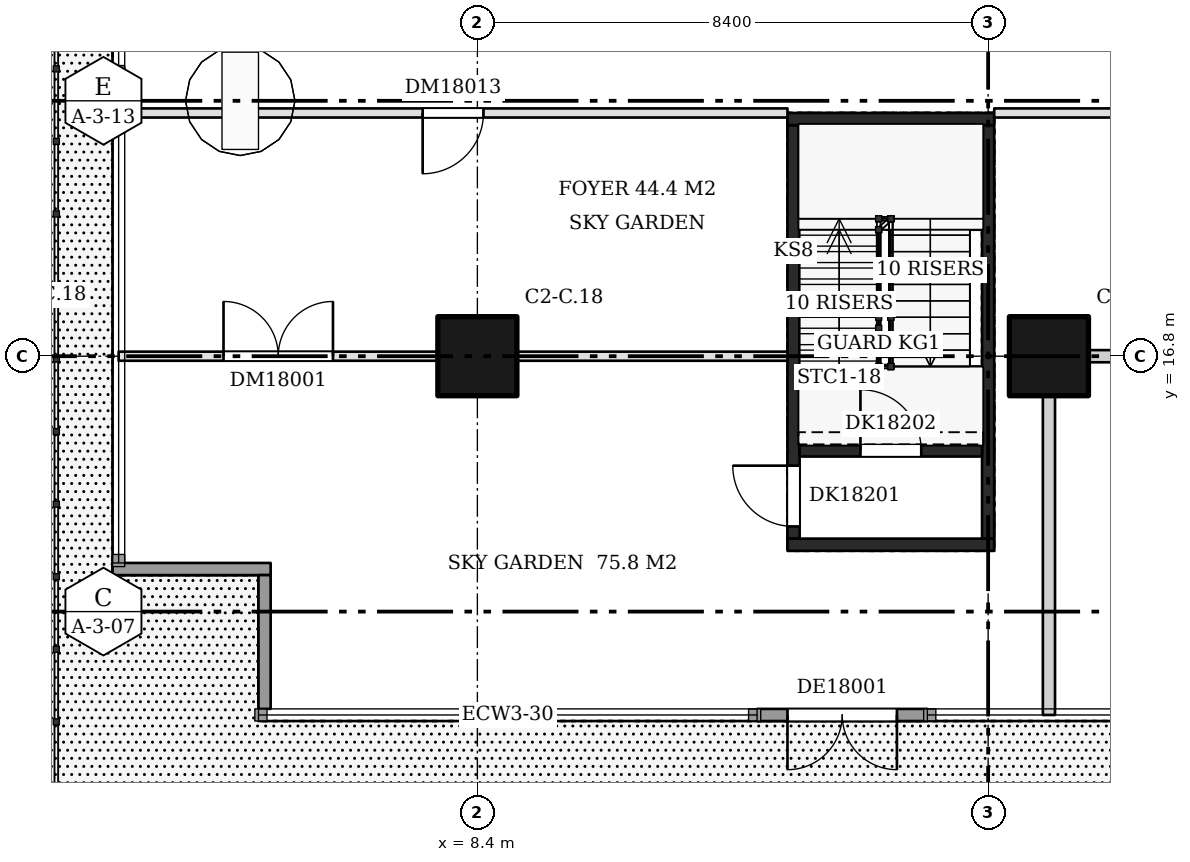
"""IFC4 building model, lengths in metres.
Left out: names, types, materials, properties, quantities, classifications, styles, units other than length and angle.
Written with IfcOpenShell. Run it as: python <this file> out.ifc"""

import sys

from ifc_helpers import new_model, si_unit, direction, frame, frame_2d, origin, origin_2d, place, context, subcontext, project, spatial, rectangle, extrude, element, fill, save


model = new_model("IFC4")
c1 = context("Model", 3, precision=1e-05, world=origin(), true_north=direction((0.0, 1.0)))
c2 = subcontext(c1, "Body", "Model", "MODEL_VIEW")
j1 = project(units=[si_unit("LENGTHUNIT", "METRE"), si_unit("PLANEANGLEUNIT", "RADIAN")], contexts=[c1])
p1 = place(None, origin())
s1 = spatial("IfcSite", under=j1, at=p1, CompositionType="ELEMENT")
p2 = place(p1, origin())
s2 = spatial("IfcBuilding", under=s1, at=p2, CompositionType="ELEMENT")
p3 = place(p2, frame((0.0, 0.0, 74.2)))
s3 = spatial("IfcBuildingStorey", under=s2, at=p3, CompositionType="ELEMENT", Elevation=74.2)
for number, where, z_axis, x_axis in (
    (1, (8.4, 16.8, 0.0), (0.0, 0.0, 1.0), (1.0, 0.0, 0.0)),
    (2, (17.8, 16.8, 0.0), (0.0, 0.0, 1.0), (1.0, 0.0, 0.0)),
):
    element("IfcColumn", number, at=place(p3, frame(where, z_axis=z_axis, x_axis=x_axis)), inside=s3, PredefinedType="COLUMN", context=c2, shape_type="SweptSolid", body=[
        extrude(rectangle(XDim=1.3, YDim=1.3, at=origin_2d()), origin(), (0.0, 0.0, 1.0), 6.72),
    ])
p4 = place(p3, frame((13.6, 13.8, 0.0), z_axis=(0.0, 0.0, 1.0), x_axis=(0.0, 1.0, 0.0)))
e3 = element("IfcWall", 3, at=p4, inside=s3, PredefinedType="SHEAR", context=c2, shape_type="SweptSolid", body=[
    extrude(rectangle(XDim=6.8, YDim=0.2, at=frame_2d((3.4, 0.0))), origin(), (0.0, 0.0, 1.0), 6.72),
])
p5 = place(p4, frame((0.2, 0.0, 0.0)))
e4 = element("IfcOpeningElement", 4, at=p5, cuts=e3, PredefinedType="OPENING", context=c2, shape_type="SweptSolid", body=[
    extrude(rectangle(XDim=1.0, YDim=2.1, at=frame_2d((0.5, 1.05))), frame((0.0, 0.11, 0.0), z_axis=(0.0, -1.0, 0.0), x_axis=(1.0, 0.0, 0.0)), (0.0, 0.0, 1.0), 0.22),
])
p6 = place(p3, frame((16.8, 13.8, 0.0), z_axis=(0.0, 0.0, 1.0), x_axis=(0.0, 1.0, 0.0)))
e5 = element("IfcWall", 5, at=p6, inside=s3, PredefinedType="SHEAR", context=c2, shape_type="SweptSolid", body=[
    extrude(rectangle(XDim=6.8, YDim=0.2, at=frame_2d((3.4, 0.0))), origin(), (0.0, 0.0, 1.0), 6.72),
])
for number, where, z_axis, x_axis in (
    (6, (13.5, 13.7, 0.0), (0.0, 0.0, 1.0), (1.0, 0.0, 0.0)),
    (7, (13.5, 20.7, 0.0), (0.0, 0.0, 1.0), (1.0, 0.0, 0.0)),
):
    element("IfcWall", number, at=place(p3, frame(where, z_axis=z_axis, x_axis=x_axis)), inside=s3, PredefinedType="SHEAR", context=c2, shape_type="SweptSolid", body=[
        extrude(rectangle(XDim=3.4, YDim=0.2, at=frame_2d((1.7, 0.0))), origin(), (0.0, 0.0, 1.0), 6.72),
    ])
p7 = place(p3, frame((13.7, 15.25, 0.0), z_axis=(0.0, 0.0, 1.0), x_axis=(1.0, 0.0, 0.0)))
e8 = element("IfcWall", 8, at=p7, inside=s3, PredefinedType="SHEAR", context=c2, shape_type="SweptSolid", body=[
    extrude(rectangle(XDim=3.0, YDim=0.2, at=frame_2d((1.5, 0.0))), origin(), (0.0, 0.0, 1.0), 6.72),
])
p8 = place(p7, frame((1.0, 0.0, 0.0)))
e9 = element("IfcOpeningElement", 9, at=p8, cuts=e8, PredefinedType="OPENING", context=c2, shape_type="SweptSolid", body=[
    extrude(rectangle(XDim=1.0, YDim=2.1, at=frame_2d((0.5, 1.05))), frame((0.0, 0.11, 0.0), z_axis=(0.0, -1.0, 0.0), x_axis=(1.0, 0.0, 0.0)), (0.0, 0.0, 1.0), 0.22),
])
p9 = place(p3, frame((2.5, 16.8, 0.0), z_axis=(0.0, 0.0, 1.0), x_axis=(1.0, 0.0, 0.0)))
e10 = element("IfcWall", 10, at=p9, inside=s3, PredefinedType="PARTITIONING", context=c2, shape_type="SweptSolid", body=[
    extrude(rectangle(XDim=5.25, YDim=0.15, at=frame_2d((2.625, 0.0))), origin(), (0.0, 0.0, 1.0), 6.72),
])
p10 = place(p9, frame((1.725, 0.0, 0.0)))
e11 = element("IfcOpeningElement", 11, at=p10, cuts=e10, PredefinedType="OPENING", context=c2, shape_type="SweptSolid", body=[
    extrude(rectangle(XDim=1.8, YDim=2.1, at=frame_2d((0.9, 1.05))), frame((0.0, 0.085, 0.0), z_axis=(0.0, -1.0, 0.0), x_axis=(1.0, 0.0, 0.0)), (0.0, 0.0, 1.0), 0.17),
])
p11 = place(p3, frame((9.05, 16.8, 0.0), z_axis=(0.0, 0.0, 1.0), x_axis=(1.0, 0.0, 0.0)))
e12 = element("IfcWall", 12, at=p11, inside=s3, PredefinedType="PARTITIONING", context=c2, shape_type="SweptSolid", body=[
    extrude(rectangle(XDim=4.45, YDim=0.15, at=frame_2d((2.225, 0.0))), origin(), (0.0, 0.0, 1.0), 6.72),
])
p12 = place(p3, frame((2.5, 20.8, 0.0), z_axis=(0.0, 0.0, 1.0), x_axis=(1.0, 0.0, 0.0)))
e13 = element("IfcWall", 13, at=p12, inside=s3, PredefinedType="PARTITIONING", context=c2, shape_type="SweptSolid", body=[
    extrude(rectangle(XDim=11.0, YDim=0.15, at=frame_2d((5.5, 0.0))), origin(), (0.0, 0.0, 1.0), 6.72),
])
p13 = place(p12, frame((5.0, 0.0, 0.0)))
e14 = element("IfcOpeningElement", 14, at=p13, cuts=e13, PredefinedType="OPENING", context=c2, shape_type="SweptSolid", body=[
    extrude(rectangle(XDim=1.0, YDim=2.1, at=frame_2d((0.5, 1.05))), frame((0.0, 0.085, 0.0), z_axis=(0.0, -1.0, 0.0), x_axis=(1.0, 0.0, 0.0)), (0.0, 0.0, 1.0), 0.17),
])
p14 = place(p3, frame((16.9, 20.8, 0.0), z_axis=(0.0, 0.0, 1.0), x_axis=(1.0, 0.0, 0.0)))
e15 = element("IfcWall", 15, at=p14, inside=s3, PredefinedType="PARTITIONING", context=c2, shape_type="SweptSolid", body=[
    extrude(rectangle(XDim=19.175, YDim=0.15, at=frame_2d((9.587, 0.0))), origin(), (0.0, 0.0, 1.0), 6.72),
])
p15 = place(p14, frame((9.087, 0.0, 0.0)))
e16 = element("IfcOpeningElement", 16, at=p15, cuts=e15, PredefinedType="OPENING", context=c2, shape_type="SweptSolid", body=[
    extrude(rectangle(XDim=1.0, YDim=2.1, at=frame_2d((0.5, 1.05))), frame((0.0, 0.085, 0.0), z_axis=(0.0, -1.0, 0.0), x_axis=(1.0, 0.0, 0.0)), (0.0, 0.0, 1.0), 0.17),
])
p16 = place(p3, frame((17.8, 10.9, 0.0), z_axis=(0.0, 0.0, 1.0), x_axis=(0.0, 1.0, 0.0)))
e17 = element("IfcWall", 17, at=p16, inside=s3, PredefinedType="PARTITIONING", context=c2, shape_type="SweptSolid", body=[
    extrude(rectangle(XDim=5.25, YDim=0.2, at=frame_2d((2.625, 0.0))), origin(), (0.0, 0.0, 1.0), 6.72),
])
p17 = place(p3, frame((18.45, 16.8, 0.0), z_axis=(0.0, 0.0, 1.0), x_axis=(1.0, 0.0, 0.0)))
e18 = element("IfcWall", 18, at=p17, inside=s3, PredefinedType="PARTITIONING", context=c2, shape_type="SweptSolid", body=[
    extrude(rectangle(XDim=3.05, YDim=0.2, at=frame_2d((1.525, 0.0))), origin(), (0.0, 0.0, 1.0), 6.72),
])
p18 = place(p17, frame((1.025, 0.0, 0.0)))
e19 = element("IfcOpeningElement", 19, at=p18, cuts=e18, PredefinedType="OPENING", context=c2, shape_type="SweptSolid", body=[
    extrude(rectangle(XDim=1.0, YDim=2.1, at=frame_2d((0.5, 1.05))), frame((0.0, 0.11, 0.0), z_axis=(0.0, -1.0, 0.0), x_axis=(1.0, 0.0, 0.0)), (0.0, 0.0, 1.0), 0.22),
])
p19 = place(p3, frame((2.4, 13.3, 0.0), z_axis=(0.0, 0.0, 1.0), x_axis=(1.0, 0.0, 0.0)))
e20 = element("IfcWall", 20, at=p19, inside=s3, PredefinedType="SOLIDWALL", context=c2, shape_type="SweptSolid", body=[
    extrude(rectangle(XDim=2.6, YDim=0.2, at=frame_2d((1.3, 0.0))), origin(), (0.0, 0.0, 1.0), 6.72),
])
p20 = place(p3, frame((4.9, 13.2, 0.0), z_axis=(0.0, 0.0, 1.0), x_axis=(0.0, -1.0, 0.0)))
e21 = element("IfcWall", 21, at=p20, inside=s3, PredefinedType="SOLIDWALL", context=c2, shape_type="SweptSolid", body=[
    extrude(rectangle(XDim=2.2, YDim=0.2, at=frame_2d((1.1, 0.0))), origin(), (0.0, 0.0, 1.0), 6.72),
])
p21 = place(p3, frame((13.0, 10.9, 0.0), z_axis=(0.0, 0.0, 1.0), x_axis=(1.0, 0.0, 0.0)))
e22 = element("IfcWall", 22, at=p21, inside=s3, PredefinedType="SOLIDWALL", context=c2, shape_type="SweptSolid", body=[
    extrude(rectangle(XDim=2.8, YDim=0.2, at=frame_2d((1.4, 0.0))), origin(), (0.0, 0.0, 1.0), 6.72),
])
p22 = place(p21, frame((0.5, 0.0, 0.0)))
e23 = element("IfcOpeningElement", 23, at=p22, cuts=e22, PredefinedType="OPENING", context=c2, shape_type="SweptSolid", body=[
    extrude(rectangle(XDim=1.8, YDim=2.4, at=frame_2d((0.9, 1.2))), frame((0.0, 0.11, 0.0), z_axis=(0.0, -1.0, 0.0), x_axis=(1.0, 0.0, 0.0)), (0.0, 0.0, 1.0), 0.22),
])
p23 = place(p5, origin())
e24 = element("IfcDoor", 24, at=p23, inside=s3, OperationType="SINGLE_SWING_RIGHT", PredefinedType="DOOR", context=c2, shape_type="SweptSolid", body=[
    extrude(rectangle(XDim=1.0, YDim=2.1, at=frame_2d((0.5, 1.05))), frame((0.0, 0.025, 0.0), z_axis=(0.0, -1.0, 0.0), x_axis=(1.0, 0.0, 0.0)), (0.0, 0.0, 1.0), 0.05),
])
fill(e4, e24)
p24 = place(p8, origin())
e25 = element("IfcDoor", 25, at=p24, inside=s3, OperationType="SINGLE_SWING_LEFT", PredefinedType="DOOR", context=c2, shape_type="SweptSolid", body=[
    extrude(rectangle(XDim=1.0, YDim=2.1, at=frame_2d((0.5, 1.05))), frame((0.0, 0.025, 0.0), z_axis=(0.0, -1.0, 0.0), x_axis=(1.0, 0.0, 0.0)), (0.0, 0.0, 1.0), 0.05),
])
fill(e9, e25)
p25 = place(p10, origin())
e26 = element("IfcDoor", 26, at=p25, inside=s3, OperationType="DOUBLE_DOOR_SINGLE_SWING", PredefinedType="DOOR", context=c2, shape_type="SweptSolid", body=[
    extrude(rectangle(XDim=1.8, YDim=2.1, at=frame_2d((0.9, 1.05))), frame((0.0, 0.025, 0.0), z_axis=(0.0, -1.0, 0.0), x_axis=(1.0, 0.0, 0.0)), (0.0, 0.0, 1.0), 0.05),
])
fill(e11, e26)
p26 = place(p13, frame((1.0, 0.0, 0.0), z_axis=(0.0, 0.0, 1.0), x_axis=(-1.0, 0.0, 0.0)))
e27 = element("IfcDoor", 27, at=p26, inside=s3, OperationType="SINGLE_SWING_RIGHT", PredefinedType="DOOR", context=c2, shape_type="SweptSolid", body=[
    extrude(rectangle(XDim=1.0, YDim=2.1, at=frame_2d((0.5, 1.05))), frame((0.0, 0.025, 0.0), z_axis=(0.0, -1.0, 0.0), x_axis=(1.0, 0.0, 0.0)), (0.0, 0.0, 1.0), 0.05),
])
fill(e14, e27)
p27 = place(p22, frame((1.8, 0.0, 0.0), z_axis=(0.0, 0.0, 1.0), x_axis=(-1.0, 0.0, 0.0)))
e28 = element("IfcDoor", 28, at=p27, inside=s3, OperationType="DOUBLE_DOOR_SINGLE_SWING", PredefinedType="DOOR", context=c2, shape_type="SweptSolid", body=[
    extrude(rectangle(XDim=1.8, YDim=2.4, at=frame_2d((0.9, 1.2))), frame((0.0, 0.025, 0.0), z_axis=(0.0, -1.0, 0.0), x_axis=(1.0, 0.0, 0.0)), (0.0, 0.0, 1.0), 0.05),
])
fill(e23, e28)
save(model, sys.argv[1])
